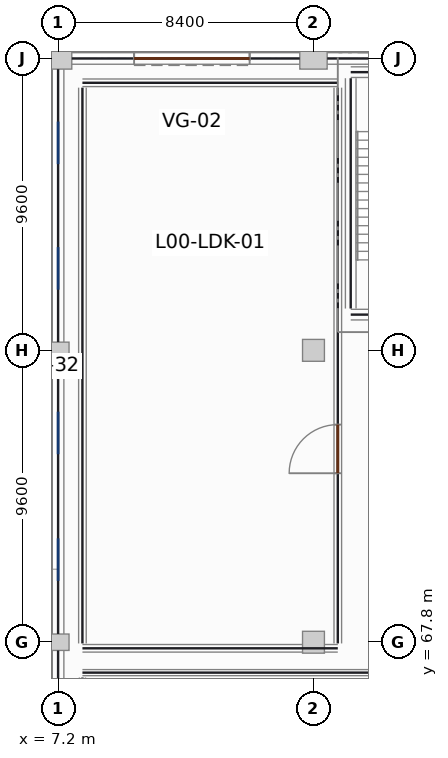
"""IFC4 building model, lengths in metres.
Left out: names, types, materials, properties, quantities, classifications, styles, units other than length and angle.
Written with IfcOpenShell. Run it as: python <this file> out.ifc"""

import sys

from ifc_helpers import new_model, si_unit, direction, frame, frame_2d, origin, origin_2d, place, context, subcontext, project, spatial, rectangle, extrude, element, fill, save


model = new_model("IFC4")
c1 = context("Model", 3, precision=1e-05, world=origin(), true_north=direction((0.0, 1.0)))
c2 = subcontext(c1, "Body", "Model", "MODEL_VIEW")
j1 = project(units=[si_unit("LENGTHUNIT", "METRE"), si_unit("PLANEANGLEUNIT", "RADIAN")], contexts=[c1])
p1 = place(None, origin())
s1 = spatial("IfcSite", under=j1, at=p1, CompositionType="ELEMENT")
p2 = place(p1, origin())
s2 = spatial("IfcBuilding", under=s1, at=p2, CompositionType="ELEMENT")
p3 = place(p2, origin())
s3 = spatial("IfcBuildingStorey", under=s2, at=p3, CompositionType="ELEMENT", Elevation=0.0)
for number, where, z_axis, x_axis in (
    (1, (7.2, 67.8, 0.0), (0.0, 0.0, 1.0), (1.0, 0.0, 0.0)),
    (2, (7.2, 77.4, 0.0), (0.0, 0.0, 1.0), (1.0, 0.0, 0.0)),
):
    element("IfcColumn", number, at=place(p3, frame(where, z_axis=z_axis, x_axis=x_axis)), inside=s3, PredefinedType="COLUMN", context=c2, shape_type="SweptSolid", body=[
        extrude(rectangle(XDim=0.72, YDim=0.54, at=origin_2d()), origin(), (0.0, 0.0, 1.0), 5.08),
    ])
p4 = place(p3, frame((7.2, 87.0, 0.0), z_axis=(0.0, 0.0, 1.0), x_axis=(1.0, 0.0, 0.0)))
e3 = element("IfcColumn", 3, at=p4, inside=s3, PredefinedType="COLUMN", context=c2, shape_type="SweptSolid", body=[
    extrude(rectangle(XDim=0.9, YDim=0.7, at=origin_2d()), origin(), (0.0, 0.0, 1.0), 5.08),
])
for number, where, z_axis, x_axis in (
    (4, (15.6, 67.8, 0.0), (0.0, 0.0, 1.0), (1.0, 0.0, 0.0)),
    (5, (15.6, 77.4, 0.0), (0.0, 0.0, 1.0), (1.0, 0.0, 0.0)),
):
    element("IfcColumn", number, at=place(p3, frame(where, z_axis=z_axis, x_axis=x_axis)), inside=s3, PredefinedType="COLUMN", context=c2, shape_type="SweptSolid", body=[
        extrude(rectangle(XDim=0.72, YDim=0.72, at=origin_2d()), origin(), (0.0, 0.0, 1.0), 5.08),
    ])
p5 = place(p3, frame((15.6, 87.0, 0.0), z_axis=(0.0, 0.0, 1.0), x_axis=(1.0, 0.0, 0.0)))
e6 = element("IfcColumn", 6, at=p5, inside=s3, PredefinedType="COLUMN", context=c2, shape_type="SweptSolid", body=[
    extrude(rectangle(XDim=0.9, YDim=0.7, at=origin_2d()), origin(), (0.0, 0.0, 1.0), 5.08),
])
p6 = place(p3, frame((7.2, 58.472, 0.0), z_axis=(0.0, 0.0, 1.0), x_axis=(0.0, 1.0, 0.0)))
e7 = element("IfcWall", 7, at=p6, inside=s3, PredefinedType="SOLIDWALL", context=c2, shape_type="SweptSolid", body=[
    extrude(rectangle(XDim=9.056, YDim=0.38, at=frame_2d((4.528, 0.0))), origin(), (0.0, 0.0, 1.0), 4.28),
])
p7 = place(p6, frame((1.745, 0.0, 0.85)))
e8 = element("IfcOpeningElement", 8, at=p7, cuts=e7, PredefinedType="OPENING", context=c2, shape_type="SweptSolid", body=[
    extrude(rectangle(XDim=1.4, YDim=1.65, at=frame_2d((0.7, 0.825))), frame((0.0, 0.2, 0.0), z_axis=(0.0, -1.0, 0.0), x_axis=(1.0, 0.0, 0.0)), (0.0, 0.0, 1.0), 0.4),
])
p8 = place(p6, frame((5.911, 0.0, 0.85)))
e9 = element("IfcOpeningElement", 9, at=p8, cuts=e7, PredefinedType="OPENING", context=c2, shape_type="SweptSolid", body=[
    extrude(rectangle(XDim=1.4, YDim=1.65, at=frame_2d((0.7, 0.825))), frame((0.0, 0.2, 0.0), z_axis=(0.0, -1.0, 0.0), x_axis=(1.0, 0.0, 0.0)), (0.0, 0.0, 1.0), 0.4),
])
p9 = place(p3, frame((7.2, 68.072, 0.0), z_axis=(0.0, 0.0, 1.0), x_axis=(0.0, 1.0, 0.0)))
e10 = element("IfcWall", 10, at=p9, inside=s3, PredefinedType="SOLIDWALL", context=c2, shape_type="SweptSolid", body=[
    extrude(rectangle(XDim=9.056, YDim=0.38, at=frame_2d((4.528, 0.0))), origin(), (0.0, 0.0, 1.0), 4.28),
])
p10 = place(p9, frame((1.745, 0.0, 0.85)))
e11 = element("IfcOpeningElement", 11, at=p10, cuts=e10, PredefinedType="OPENING", context=c2, shape_type="SweptSolid", body=[
    extrude(rectangle(XDim=1.4, YDim=1.65, at=frame_2d((0.7, 0.825))), frame((0.0, 0.2, 0.0), z_axis=(0.0, -1.0, 0.0), x_axis=(1.0, 0.0, 0.0)), (0.0, 0.0, 1.0), 0.4),
])
p11 = place(p9, frame((5.911, 0.0, 0.85)))
e12 = element("IfcOpeningElement", 12, at=p11, cuts=e10, PredefinedType="OPENING", context=c2, shape_type="SweptSolid", body=[
    extrude(rectangle(XDim=1.4, YDim=1.65, at=frame_2d((0.7, 0.825))), frame((0.0, 0.2, 0.0), z_axis=(0.0, -1.0, 0.0), x_axis=(1.0, 0.0, 0.0)), (0.0, 0.0, 1.0), 0.4),
])
p12 = place(p3, frame((7.2, 77.672, 0.0), z_axis=(0.0, 0.0, 1.0), x_axis=(0.0, 1.0, 0.0)))
e13 = element("IfcWall", 13, at=p12, inside=s3, PredefinedType="SOLIDWALL", context=c2, shape_type="SweptSolid", body=[
    extrude(rectangle(XDim=8.976, YDim=0.38, at=frame_2d((4.488, 0.0))), origin(), (0.0, 0.0, 1.0), 4.28),
])
p13 = place(p12, frame((1.723, 0.0, 0.85)))
e14 = element("IfcOpeningElement", 14, at=p13, cuts=e13, PredefinedType="OPENING", context=c2, shape_type="SweptSolid", body=[
    extrude(rectangle(XDim=1.4, YDim=1.65, at=frame_2d((0.7, 0.825))), frame((0.0, 0.2, 0.0), z_axis=(0.0, -1.0, 0.0), x_axis=(1.0, 0.0, 0.0)), (0.0, 0.0, 1.0), 0.4),
])
p14 = place(p12, frame((5.853, 0.0, 0.85)))
e15 = element("IfcOpeningElement", 15, at=p14, cuts=e13, PredefinedType="OPENING", context=c2, shape_type="SweptSolid", body=[
    extrude(rectangle(XDim=1.4, YDim=1.65, at=frame_2d((0.7, 0.825))), frame((0.0, 0.2, 0.0), z_axis=(0.0, -1.0, 0.0), x_axis=(1.0, 0.0, 0.0)), (0.0, 0.0, 1.0), 0.4),
])
p15 = place(p3, frame((7.652, 87.0, 0.0), z_axis=(0.0, 0.0, 1.0), x_axis=(1.0, 0.0, 0.0)))
e16 = element("IfcWall", 16, at=p15, inside=s3, PredefinedType="SOLIDWALL", context=c2, shape_type="SweptSolid", body=[
    extrude(rectangle(XDim=7.496, YDim=0.38, at=frame_2d((3.748, 0.0))), origin(), (0.0, 0.0, 1.0), 4.28),
])
p16 = place(p15, frame((2.048, 0.0, 0.0)))
e17 = element("IfcOpeningElement", 17, at=p16, cuts=e16, PredefinedType="OPENING", context=c2, shape_type="SweptSolid", body=[
    extrude(rectangle(XDim=3.8, YDim=4.0, at=frame_2d((1.9, 2.0))), frame((0.0, 0.2, 0.0), z_axis=(0.0, -1.0, 0.0), x_axis=(1.0, 0.0, 0.0)), (0.0, 0.0, 1.0), 0.4),
])
p17 = place(p3, frame((16.052, 87.0, 0.0), z_axis=(0.0, 0.0, 1.0), x_axis=(1.0, 0.0, 0.0)))
e18 = element("IfcWall", 18, at=p17, inside=s3, PredefinedType="SOLIDWALL", context=c2, shape_type="SweptSolid", body=[
    extrude(rectangle(XDim=7.496, YDim=0.38, at=frame_2d((3.748, 0.0))), origin(), (0.0, 0.0, 1.0), 4.28),
])
p18 = place(p17, frame((5.198, 0.0, 0.0)))
e19 = element("IfcOpeningElement", 19, at=p18, cuts=e18, PredefinedType="OPENING", context=c2, shape_type="SweptSolid", body=[
    extrude(rectangle(XDim=1.5, YDim=2.2, at=frame_2d((0.75, 1.1))), frame((0.0, 0.2, 0.0), z_axis=(0.0, -1.0, 0.0), x_axis=(1.0, 0.0, 0.0)), (0.0, 0.0, 1.0), 0.4),
])
p19 = place(p3, frame((16.825, 78.575, 0.0), z_axis=(0.0, 0.0, 1.0), x_axis=(1.0, 0.0, 0.0)))
e20 = element("IfcWall", 20, at=p19, inside=s3, PredefinedType="SHEAR", context=c2, shape_type="SweptSolid", body=[
    extrude(rectangle(XDim=3.6, YDim=0.35, at=frame_2d((1.8, 0.0))), origin(), (0.0, 0.0, 1.0), 5.08),
])
p20 = place(p19, frame((1.1, 0.0, 0.0)))
e21 = element("IfcOpeningElement", 21, at=p20, cuts=e20, PredefinedType="OPENING", context=c2, shape_type="SweptSolid", body=[
    extrude(rectangle(XDim=1.2, YDim=2.2, at=frame_2d((0.6, 1.1))), frame((0.0, 0.185, 0.0), z_axis=(0.0, -1.0, 0.0), x_axis=(1.0, 0.0, 0.0)), (0.0, 0.0, 1.0), 0.37),
])
p21 = place(p3, frame((16.825, 78.775, 0.0), z_axis=(0.0, 0.0, 1.0), x_axis=(0.0, 1.0, 0.0)))
e22 = element("IfcWall", 22, at=p21, inside=s3, PredefinedType="SHEAR", context=c2, shape_type="SweptSolid", body=[
    extrude(rectangle(XDim=7.575, YDim=0.35, at=frame_2d((3.788, 0.0))), origin(), (0.0, 0.0, 1.0), 5.08),
])
p22 = place(p3, frame((16.825, 86.55, 0.0), z_axis=(0.0, 0.0, 1.0), x_axis=(1.0, 0.0, 0.0)))
e23 = element("IfcWall", 23, at=p22, inside=s3, PredefinedType="SHEAR", context=c2, shape_type="SweptSolid", body=[
    extrude(rectangle(XDim=3.6, YDim=0.35, at=frame_2d((1.8, 0.0))), origin(), (0.0, 0.0, 1.0), 5.08),
])
p23 = place(p3, frame((8.0, 66.8, 0.0), z_axis=(0.0, 0.0, 1.0), x_axis=(1.0, 0.0, 0.0)))
e24 = element("IfcWall", 24, at=p23, inside=s3, PredefinedType="PARTITIONING", context=c2, shape_type="SweptSolid", body=[
    extrude(rectangle(XDim=15.4, YDim=0.2, at=frame_2d((7.7, 0.0))), origin(), (0.0, 0.0, 1.0), 4.12),
])
p24 = place(p3, frame((8.0, 49.36, 0.0), z_axis=(0.0, 0.0, 1.0), x_axis=(0.0, 1.0, 0.0)))
e25 = element("IfcWall", 25, at=p24, inside=s3, PredefinedType="PARTITIONING", context=c2, shape_type="SweptSolid", body=[
    extrude(rectangle(XDim=17.28, YDim=0.2, at=frame_2d((8.64, 0.0))), origin(), (0.0, 0.0, 1.0), 4.12),
])
for number, where, z_axis, x_axis in (
    (26, (8.0, 67.6, 0.0), (0.0, 0.0, 1.0), (1.0, 0.0, 0.0)),
    (27, (8.0, 86.2, 0.0), (0.0, 0.0, 1.0), (1.0, 0.0, 0.0)),
):
    element("IfcWall", number, at=place(p3, frame(where, z_axis=z_axis, x_axis=x_axis)), inside=s3, PredefinedType="PARTITIONING", context=c2, shape_type="SweptSolid", body=[
        extrude(rectangle(XDim=8.4, YDim=0.25, at=frame_2d((4.2, 0.0))), origin(), (0.0, 0.0, 1.0), 4.12),
    ])
p25 = place(p3, frame((8.0, 67.76, 0.0), z_axis=(0.0, 0.0, 1.0), x_axis=(0.0, 1.0, 0.0)))
e28 = element("IfcWall", 28, at=p25, inside=s3, PredefinedType="PARTITIONING", context=c2, shape_type="SweptSolid", body=[
    extrude(rectangle(XDim=18.28, YDim=0.25, at=frame_2d((9.14, 0.0))), origin(), (0.0, 0.0, 1.0), 4.12),
])
p26 = place(p3, frame((16.4, 67.76, 0.0), z_axis=(0.0, 0.0, 1.0), x_axis=(0.0, 1.0, 0.0)))
e29 = element("IfcWall", 29, at=p26, inside=s3, PredefinedType="PARTITIONING", context=c2, shape_type="SweptSolid", body=[
    extrude(rectangle(XDim=18.28, YDim=0.25, at=frame_2d((9.14, 0.0))), origin(), (0.0, 0.0, 1.0), 4.12),
])
p27 = place(p26, frame((5.598, 0.0, 0.0)))
e30 = element("IfcOpeningElement", 30, at=p27, cuts=e29, PredefinedType="OPENING", context=c2, shape_type="SweptSolid", body=[
    extrude(rectangle(XDim=1.6, YDim=2.3, at=frame_2d((0.8, 1.15))), frame((0.0, 0.135, 0.0), z_axis=(0.0, -1.0, 0.0), x_axis=(1.0, 0.0, 0.0)), (0.0, 0.0, 1.0), 0.27),
])
p28 = place(p10, origin())
e31 = element("IfcWindow", 31, at=p28, inside=s3, PartitioningType="SINGLE_PANEL", PredefinedType="WINDOW", context=c2, shape_type="SweptSolid", body=[
    extrude(rectangle(XDim=1.4, YDim=1.65, at=frame_2d((0.7, 0.825))), frame((0.0, 0.03, 0.0), z_axis=(0.0, -1.0, 0.0), x_axis=(1.0, 0.0, 0.0)), (0.0, 0.0, 1.0), 0.06),
])
fill(e11, e31)
p29 = place(p11, origin())
e32 = element("IfcWindow", 32, at=p29, inside=s3, PartitioningType="SINGLE_PANEL", PredefinedType="WINDOW", context=c2, shape_type="SweptSolid", body=[
    extrude(rectangle(XDim=1.4, YDim=1.65, at=frame_2d((0.7, 0.825))), frame((0.0, 0.03, 0.0), z_axis=(0.0, -1.0, 0.0), x_axis=(1.0, 0.0, 0.0)), (0.0, 0.0, 1.0), 0.06),
])
fill(e12, e32)
p30 = place(p13, origin())
e33 = element("IfcWindow", 33, at=p30, inside=s3, PartitioningType="SINGLE_PANEL", PredefinedType="WINDOW", context=c2, shape_type="SweptSolid", body=[
    extrude(rectangle(XDim=1.4, YDim=1.65, at=frame_2d((0.7, 0.825))), frame((0.0, 0.03, 0.0), z_axis=(0.0, -1.0, 0.0), x_axis=(1.0, 0.0, 0.0)), (0.0, 0.0, 1.0), 0.06),
])
fill(e14, e33)
p31 = place(p14, origin())
e34 = element("IfcWindow", 34, at=p31, inside=s3, PartitioningType="SINGLE_PANEL", PredefinedType="WINDOW", context=c2, shape_type="SweptSolid", body=[
    extrude(rectangle(XDim=1.4, YDim=1.65, at=frame_2d((0.7, 0.825))), frame((0.0, 0.03, 0.0), z_axis=(0.0, -1.0, 0.0), x_axis=(1.0, 0.0, 0.0)), (0.0, 0.0, 1.0), 0.06),
])
fill(e15, e34)
p32 = place(p16, origin())
e35 = element("IfcDoor", 35, at=p32, inside=s3, OperationType="ROLLINGUP", PredefinedType="GATE", context=c2, shape_type="SweptSolid", body=[
    extrude(rectangle(XDim=3.8, YDim=4.0, at=frame_2d((1.9, 2.0))), frame((0.0, 0.025, 0.0), z_axis=(0.0, -1.0, 0.0), x_axis=(1.0, 0.0, 0.0)), (0.0, 0.0, 1.0), 0.05),
])
fill(e17, e35)
p33 = place(p27, origin())
e36 = element("IfcDoor", 36, at=p33, inside=s3, OperationType="SINGLE_SWING_LEFT", PredefinedType="DOOR", context=c2, shape_type="SweptSolid", body=[
    extrude(rectangle(XDim=1.6, YDim=2.3, at=frame_2d((0.8, 1.15))), frame((0.0, 0.025, 0.0), z_axis=(0.0, -1.0, 0.0), x_axis=(1.0, 0.0, 0.0)), (0.0, 0.0, 1.0), 0.05),
])
fill(e30, e36)
save(model, sys.argv[1])
